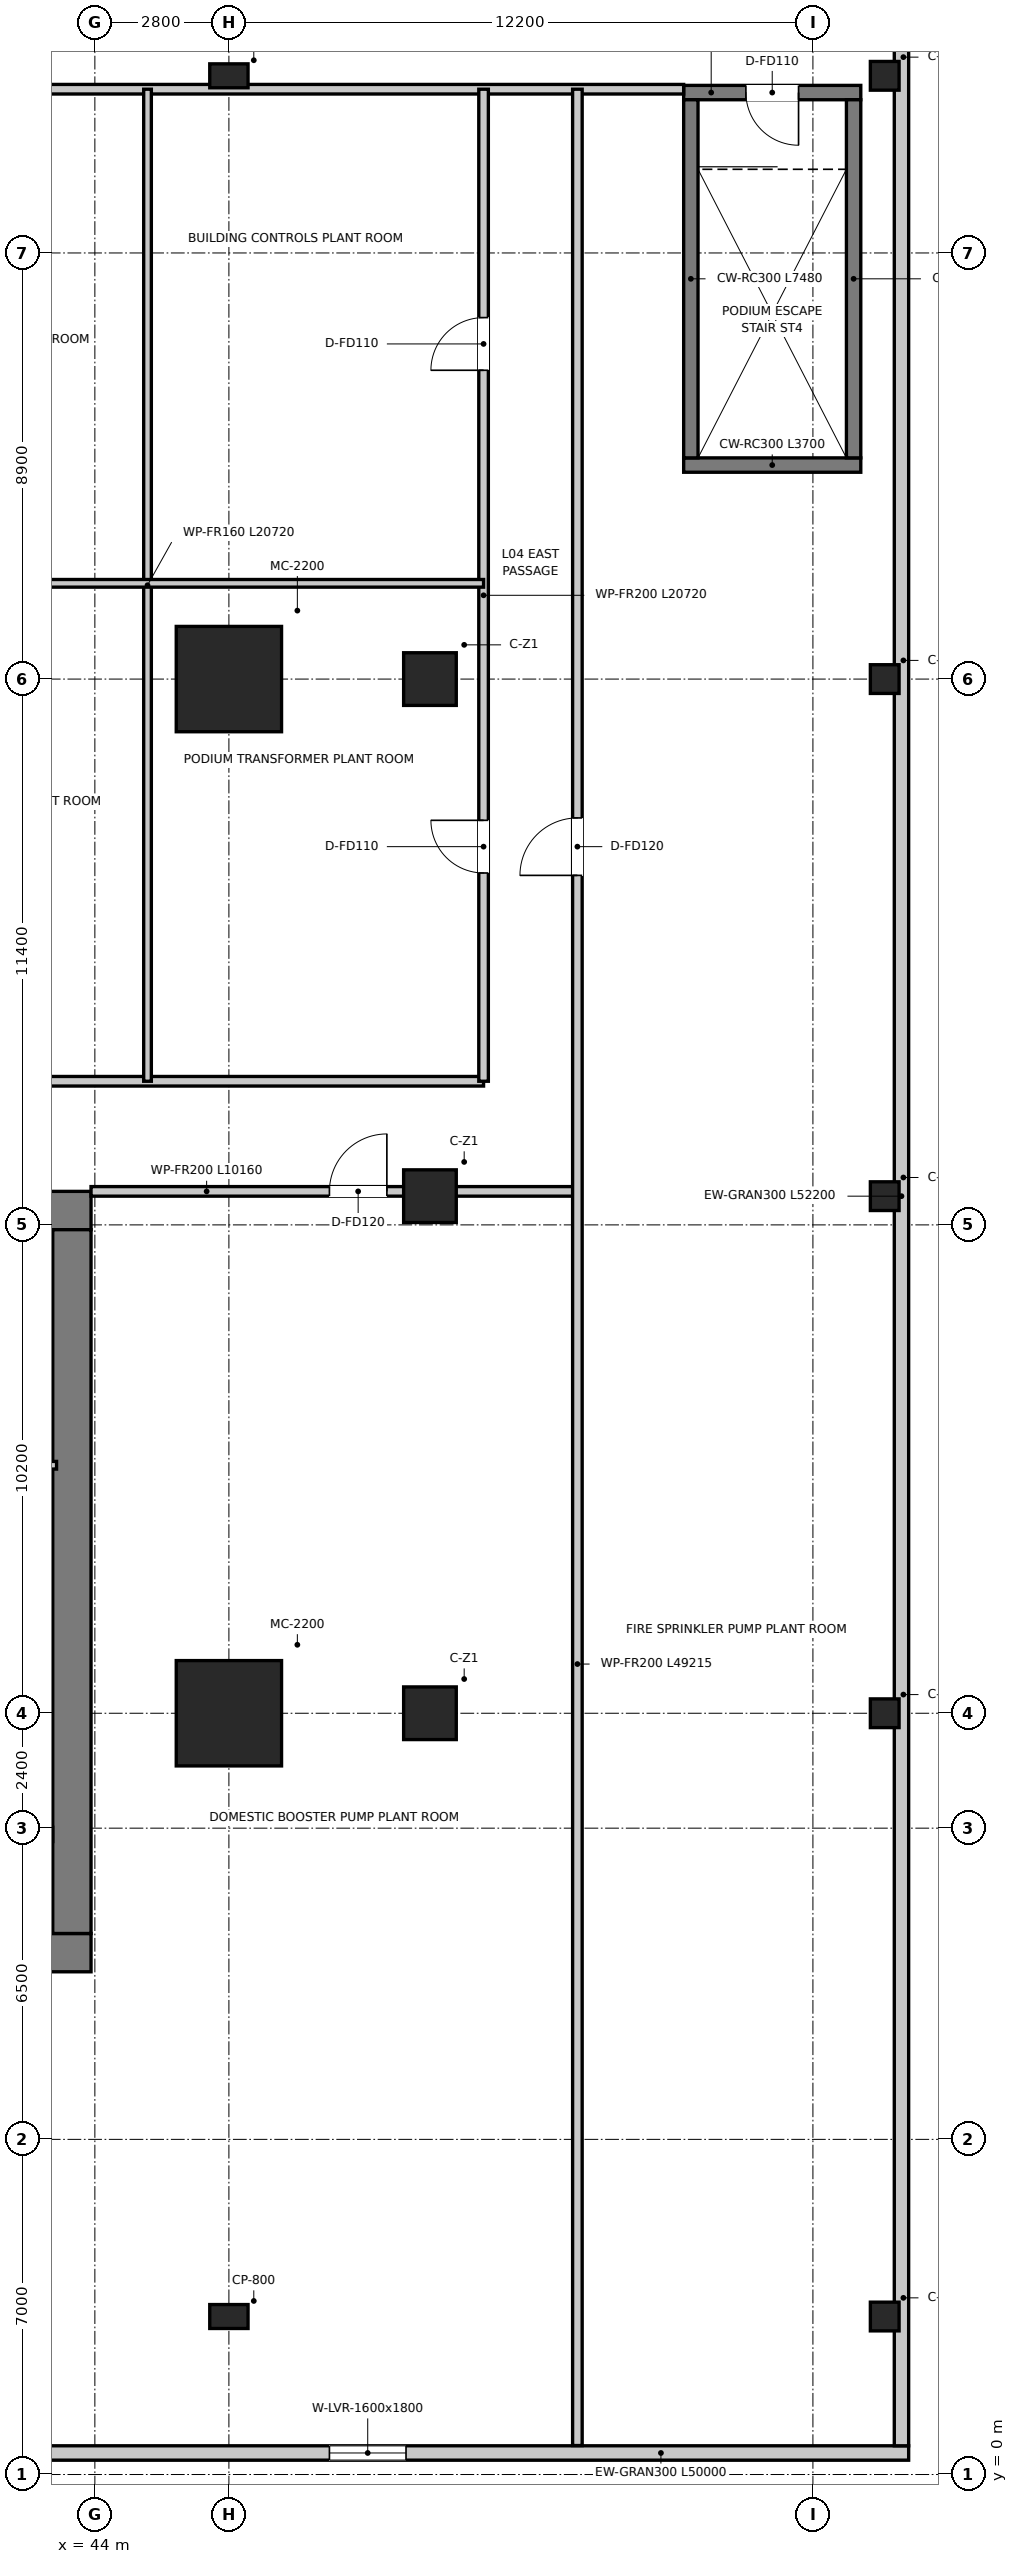
"""IFC4 building model, lengths in metres.
Left out: names, types, materials, properties, quantities, classifications, styles, units other than length and angle.
Written with IfcOpenShell. Run it as: python <this file> out.ifc"""

import sys

from ifc_helpers import new_model, si_unit, direction, frame, frame_2d, origin, origin_2d, place, context, subcontext, project, spatial, rectangle, extrude, source, transform, mapped, element, fill, save


model = new_model("IFC4")
c1 = context("Model", 3, precision=1e-05, world=origin(), true_north=direction((0.0, 1.0)))
c2 = subcontext(c1, "Body", "Model", "MODEL_VIEW")
j1 = project(units=[si_unit("LENGTHUNIT", "METRE"), si_unit("PLANEANGLEUNIT", "RADIAN")], contexts=[c1])
p1 = place(None, origin())
s1 = spatial("IfcSite", under=j1, at=p1, CompositionType="ELEMENT")
p2 = place(p1, origin())
s2 = spatial("IfcBuilding", under=s1, at=p2, CompositionType="ELEMENT")
p3 = place(p2, frame((0.0, 0.0, 20.0)))
s3 = spatial("IfcBuildingStorey", under=s2, at=p3, CompositionType="ELEMENT", Elevation=20.0)
p4 = place(p3, frame((28.08, 10.9, 0.0), z_axis=(0.0, 0.0, 1.0), x_axis=(1.0, 0.0, 0.0)))
e1 = element("IfcWall", 1, at=p4, inside=s3, PredefinedType="SHEAR", context=c2, shape_type="SweptSolid", body=[
    extrude(rectangle(XDim=15.84, YDim=0.8, at=frame_2d((7.92, 0.0))), origin(), (0.0, 0.0, 1.0), 5.0),
])
p5 = place(p3, frame((28.08, 26.4, 0.0), z_axis=(0.0, 0.0, 1.0), x_axis=(1.0, 0.0, 0.0)))
e2 = element("IfcWall", 2, at=p5, inside=s3, PredefinedType="SHEAR", context=c2, shape_type="SweptSolid", body=[
    extrude(rectangle(XDim=15.84, YDim=0.8, at=frame_2d((7.92, 0.0))), origin(), (0.0, 0.0, 1.0), 5.0),
])
p6 = place(p5, frame((7.22, 0.0, 0.0)))
e3 = element("IfcOpeningElement", 3, at=p6, cuts=e2, PredefinedType="OPENING", context=c2, shape_type="SweptSolid", body=[
    extrude(rectangle(XDim=1.4, YDim=2.2, at=frame_2d((0.7, 1.1))), frame((0.0, 0.41, 0.0), z_axis=(0.0, -1.0, 0.0), x_axis=(1.0, 0.0, 0.0)), (0.0, 0.0, 1.0), 0.82),
])
p7 = place(p5, frame((1.775, 0.0, 0.0)))
e4 = element("IfcOpeningElement", 4, at=p7, cuts=e2, PredefinedType="OPENING", context=c2, shape_type="SweptSolid", body=[
    extrude(rectangle(XDim=1.05, YDim=2.1, at=frame_2d((0.525, 1.05))), frame((0.0, 0.41, 0.0), z_axis=(0.0, -1.0, 0.0), x_axis=(1.0, 0.0, 0.0)), (0.0, 0.0, 1.0), 0.82),
])
p8 = place(p5, frame((13.015, 0.0, 0.0)))
e5 = element("IfcOpeningElement", 5, at=p8, cuts=e2, PredefinedType="OPENING", context=c2, shape_type="SweptSolid", body=[
    extrude(rectangle(XDim=1.05, YDim=2.1, at=frame_2d((0.525, 1.05))), frame((0.0, 0.41, 0.0), z_axis=(0.0, -1.0, 0.0), x_axis=(1.0, 0.0, 0.0)), (0.0, 0.0, 1.0), 0.82),
])
p9 = place(p3, frame((43.52, 11.3, 0.0), z_axis=(0.0, 0.0, 1.0), x_axis=(0.0, 1.0, 0.0)))
e6 = element("IfcWall", 6, at=p9, inside=s3, PredefinedType="SHEAR", context=c2, shape_type="SweptSolid", body=[
    extrude(rectangle(XDim=14.7, YDim=0.8, at=frame_2d((7.35, 0.0))), origin(), (0.0, 0.0, 1.0), 5.0),
])
p10 = place(p3, frame((40.02, 13.37, 0.0), z_axis=(0.0, 0.0, 1.0), x_axis=(1.0, 0.0, 0.0)))
e7 = element("IfcWall", 7, at=p10, inside=s3, PredefinedType="SHEAR", context=c2, shape_type="SweptSolid", body=[
    extrude(rectangle(XDim=3.1, YDim=0.3, at=frame_2d((1.55, 0.0))), origin(), (0.0, 0.0, 1.0), 5.0),
])
p11 = place(p3, frame((56.3, 41.97, 0.0), z_axis=(0.0, 0.0, 1.0), x_axis=(1.0, 0.0, 0.0)))
e8 = element("IfcWall", 8, at=p11, inside=s3, PredefinedType="SHEAR", context=c2, shape_type="SweptSolid", body=[
    extrude(rectangle(XDim=3.7, YDim=0.3, at=frame_2d((1.85, 0.0))), origin(), (0.0, 0.0, 1.0), 5.0),
])
p12 = place(p3, frame((60.0, 49.75, 0.0), z_axis=(0.0, 0.0, 1.0), x_axis=(-1.0, 0.0, 0.0)))
e9 = element("IfcWall", 9, at=p12, inside=s3, PredefinedType="SHEAR", context=c2, shape_type="SweptSolid", body=[
    extrude(rectangle(XDim=3.7, YDim=0.3, at=frame_2d((1.85, 0.0))), origin(), (0.0, 0.0, 1.0), 5.0),
])
p13 = place(p12, frame((1.3, 0.0, 0.0)))
e10 = element("IfcOpeningElement", 10, at=p13, cuts=e9, PredefinedType="OPENING", context=c2, shape_type="SweptSolid", body=[
    extrude(rectangle(XDim=1.1, YDim=2.15, at=frame_2d((0.55, 1.075))), frame((0.0, 0.16, 0.0), z_axis=(0.0, -1.0, 0.0), x_axis=(1.0, 0.0, 0.0)), (0.0, 0.0, 1.0), 0.32),
])
for number, where, z_axis, x_axis in (
    (11, (56.45, 42.12, 0.0), (0.0, 0.0, 1.0), (0.0, 1.0, 0.0)),
    (12, (59.85, 42.12, 0.0), (0.0, 0.0, 1.0), (0.0, 1.0, 0.0)),
):
    element("IfcWall", number, at=place(p3, frame(where, z_axis=z_axis, x_axis=x_axis)), inside=s3, PredefinedType="SHEAR", context=c2, shape_type="SweptSolid", body=[
        extrude(rectangle(XDim=7.48, YDim=0.3, at=frame_2d((3.74, 0.0))), origin(), (0.0, 0.0, 1.0), 5.0),
    ])
m1 = source(origin(), c2, "Body", "SweptSolid", [
    extrude(rectangle(XDim=2.2, YDim=2.2, at=origin_2d()), origin(), (0.0, 0.0, 1.0), 5.0),
])
for number, where, z_axis, x_axis in (
    (13, (46.8, 15.9, 0.0), (0.0, 0.0, 1.0), (1.0, 0.0, 0.0)),
    (14, (46.8, 37.5, 0.0), (0.0, 0.0, 1.0), (1.0, 0.0, 0.0)),
):
    element("IfcColumn", number, at=place(p3, frame(where, z_axis=z_axis, x_axis=x_axis)), inside=s3, PredefinedType="USERDEFINED", context=c2, shape_type="MappedRepresentation", body=[
        mapped(m1, transform((0.0, 0.0, 0.0), x_axis=(1.0, 0.0, 0.0), y_axis=(0.0, 1.0, 0.0), z_axis=(0.0, 0.0, 1.0), scale=1.0)),
    ])
m2 = source(origin(), c2, "Body", "SweptSolid", [
    extrude(rectangle(XDim=1.1, YDim=1.1, at=origin_2d()), origin(), (0.0, 0.0, 1.0), 5.0),
])
for number, where, z_axis, x_axis in (
    (15, (51.0, 37.5, 0.0), (0.0, 0.0, 1.0), (1.0, 0.0, 0.0)),
    (16, (51.0, 26.7, 0.0), (0.0, 0.0, 1.0), (1.0, 0.0, 0.0)),
    (17, (51.0, 15.9, 0.0), (0.0, 0.0, 1.0), (1.0, 0.0, 0.0)),
):
    element("IfcColumn", number, at=place(p3, frame(where, z_axis=z_axis, x_axis=x_axis)), inside=s3, PredefinedType="COLUMN", context=c2, shape_type="MappedRepresentation", body=[
        mapped(m2, transform((0.0, 0.0, 0.0), x_axis=(1.0, 0.0, 0.0), y_axis=(0.0, 1.0, 0.0), z_axis=(0.0, 0.0, 1.0), scale=1.0)),
    ])
m3 = source(origin(), c2, "Body", "SweptSolid", [
    extrude(rectangle(XDim=0.6, YDim=0.6, at=origin_2d()), origin(), (0.0, 0.0, 1.0), 5.0),
])
for number, where, z_axis, x_axis in (
    (18, (60.5, 15.9, 0.0), (0.0, 0.0, 1.0), (1.0, 0.0, 0.0)),
    (19, (60.5, 26.7, 0.0), (0.0, 0.0, 1.0), (1.0, 0.0, 0.0)),
    (20, (60.5, 37.5, 0.0), (0.0, 0.0, 1.0), (1.0, 0.0, 0.0)),
    (21, (60.5, 50.1, 0.0), (0.0, 0.0, 1.0), (1.0, 0.0, 0.0)),
    (22, (60.5, 3.3, 0.0), (0.0, 0.0, 1.0), (1.0, 0.0, 0.0)),
):
    element("IfcColumn", number, at=place(p3, frame(where, z_axis=z_axis, x_axis=x_axis)), inside=s3, PredefinedType="COLUMN", context=c2, shape_type="MappedRepresentation", body=[
        mapped(m3, transform((0.0, 0.0, 0.0), x_axis=(1.0, 0.0, 0.0), y_axis=(0.0, 1.0, 0.0), z_axis=(0.0, 0.0, 1.0), scale=1.0)),
    ])
m4 = source(origin(), c2, "Body", "SweptSolid", [
    extrude(rectangle(XDim=0.8, YDim=0.5, at=origin_2d()), origin(), (0.0, 0.0, 1.0), 5.0),
])
for number, where, z_axis, x_axis in (
    (23, (46.8, 3.3, 0.0), (0.0, 0.0, 1.0), (1.0, 0.0, 0.0)),
    (24, (46.8, 50.1, 0.0), (0.0, 0.0, 1.0), (1.0, 0.0, 0.0)),
):
    element("IfcColumn", number, at=place(p3, frame(where, z_axis=z_axis, x_axis=x_axis)), inside=s3, PredefinedType="PILASTER", context=c2, shape_type="MappedRepresentation", body=[
        mapped(m4, transform((0.0, 0.0, 0.0), x_axis=(1.0, 0.0, 0.0), y_axis=(0.0, 1.0, 0.0), z_axis=(0.0, 0.0, 1.0), scale=1.0)),
    ])
p14 = place(p3, frame((61.0, 0.45, 0.0), z_axis=(0.0, 0.0, 1.0), x_axis=(-1.0, 0.0, 0.0)))
e25 = element("IfcWall", 25, at=p14, inside=s3, PredefinedType="SOLIDWALL", context=c2, shape_type="SweptSolid", body=[
    extrude(rectangle(XDim=50.0, YDim=0.3, at=frame_2d((25.0, 0.0))), origin(), (0.0, 0.0, 1.0), 4.72),
])
p15 = place(p14, frame((43.5, 0.0, 1.2)))
e26 = element("IfcOpeningElement", 26, at=p15, cuts=e25, PredefinedType="OPENING", context=c2, shape_type="SweptSolid", body=[
    extrude(rectangle(XDim=1.6, YDim=1.8, at=frame_2d((0.8, 0.9))), frame((0.0, 0.16, 0.0), z_axis=(0.0, -1.0, 0.0), x_axis=(1.0, 0.0, 0.0)), (0.0, 0.0, 1.0), 0.32),
])
p16 = place(p14, frame((34.5, 0.0, 1.2)))
e27 = element("IfcOpeningElement", 27, at=p16, cuts=e25, PredefinedType="OPENING", context=c2, shape_type="SweptSolid", body=[
    extrude(rectangle(XDim=1.6, YDim=1.8, at=frame_2d((0.8, 0.9))), frame((0.0, 0.16, 0.0), z_axis=(0.0, -1.0, 0.0), x_axis=(1.0, 0.0, 0.0)), (0.0, 0.0, 1.0), 0.32),
])
p17 = place(p14, frame((28.0, 0.0, 1.2)))
e28 = element("IfcOpeningElement", 28, at=p17, cuts=e25, PredefinedType="OPENING", context=c2, shape_type="SweptSolid", body=[
    extrude(rectangle(XDim=1.6, YDim=1.8, at=frame_2d((0.8, 0.9))), frame((0.0, 0.16, 0.0), z_axis=(0.0, -1.0, 0.0), x_axis=(1.0, 0.0, 0.0)), (0.0, 0.0, 1.0), 0.32),
])
p18 = place(p14, frame((20.0, 0.0, 1.2)))
e29 = element("IfcOpeningElement", 29, at=p18, cuts=e25, PredefinedType="OPENING", context=c2, shape_type="SweptSolid", body=[
    extrude(rectangle(XDim=1.6, YDim=1.8, at=frame_2d((0.8, 0.9))), frame((0.0, 0.16, 0.0), z_axis=(0.0, -1.0, 0.0), x_axis=(1.0, 0.0, 0.0)), (0.0, 0.0, 1.0), 0.32),
])
p19 = place(p14, frame((10.5, 0.0, 1.2)))
e30 = element("IfcOpeningElement", 30, at=p19, cuts=e25, PredefinedType="OPENING", context=c2, shape_type="SweptSolid", body=[
    extrude(rectangle(XDim=1.6, YDim=1.8, at=frame_2d((0.8, 0.9))), frame((0.0, 0.16, 0.0), z_axis=(0.0, -1.0, 0.0), x_axis=(1.0, 0.0, 0.0)), (0.0, 0.0, 1.0), 0.32),
])
p20 = place(p3, frame((60.85, 52.8, 0.0), z_axis=(0.0, 0.0, 1.0), x_axis=(0.0, -1.0, 0.0)))
e31 = element("IfcWall", 31, at=p20, inside=s3, PredefinedType="SOLIDWALL", context=c2, shape_type="SweptSolid", body=[
    extrude(rectangle(XDim=52.2, YDim=0.3, at=frame_2d((26.1, 0.0))), origin(), (0.0, 0.0, 1.0), 4.72),
])
p21 = place(p3, frame((40.04, 21.08, 0.0), z_axis=(0.0, 0.0, 1.0), x_axis=(1.0, 0.0, 0.0)))
e32 = element("IfcWall", 32, at=p21, inside=s3, PredefinedType="PARTITIONING", context=c2, shape_type="SweptSolid", body=[
    extrude(rectangle(XDim=3.16, YDim=0.16, at=frame_2d((1.58, 0.0))), origin(), (0.0, 0.0, 1.0), 4.72),
])
p22 = place(p21, frame((1.055, 0.0, 0.0)))
e33 = element("IfcOpeningElement", 33, at=p22, cuts=e32, PredefinedType="OPENING", context=c2, shape_type="SweptSolid", body=[
    extrude(rectangle(XDim=1.05, YDim=2.1, at=frame_2d((0.525, 1.05))), frame((0.0, 0.09, 0.0), z_axis=(0.0, -1.0, 0.0), x_axis=(1.0, 0.0, 0.0)), (0.0, 0.0, 1.0), 0.18),
])
p23 = place(p3, frame((43.92, 26.8, 0.0), z_axis=(0.0, 0.0, 1.0), x_axis=(1.0, 0.0, 0.0)))
e34 = element("IfcWall", 34, at=p23, inside=s3, PredefinedType="PARTITIONING", context=c2, shape_type="SweptSolid", body=[
    extrude(rectangle(XDim=10.16, YDim=0.2, at=frame_2d((5.08, 0.0))), origin(), (0.0, 0.0, 1.0), 3.92),
])
p24 = place(p23, frame((4.98, 0.0, 0.0)))
e35 = element("IfcOpeningElement", 35, at=p24, cuts=e34, PredefinedType="OPENING", context=c2, shape_type="SweptSolid", body=[
    extrude(rectangle(XDim=1.2, YDim=2.15, at=frame_2d((0.6, 1.075))), frame((0.0, 0.11, 0.0), z_axis=(0.0, -1.0, 0.0), x_axis=(1.0, 0.0, 0.0)), (0.0, 0.0, 1.0), 0.22),
])
p25 = place(p3, frame((24.08, 29.1, 0.0), z_axis=(0.0, 0.0, 1.0), x_axis=(1.0, 0.0, 0.0)))
e36 = element("IfcWall", 36, at=p25, inside=s3, PredefinedType="PARTITIONING", context=c2, shape_type="SweptSolid", body=[
    extrude(rectangle(XDim=28.04, YDim=0.2, at=frame_2d((14.02, 0.0))), origin(), (0.0, 0.0, 1.0), 3.92),
])
p26 = place(p25, frame((9.97, 0.0, 0.0)))
e37 = element("IfcOpeningElement", 37, at=p26, cuts=e36, PredefinedType="OPENING", context=c2, shape_type="SweptSolid", body=[
    extrude(rectangle(XDim=1.1, YDim=2.15, at=frame_2d((0.55, 1.075))), frame((0.0, 0.11, 0.0), z_axis=(0.0, -1.0, 0.0), x_axis=(1.0, 0.0, 0.0)), (0.0, 0.0, 1.0), 0.22),
])
p27 = place(p25, frame((16.97, 0.0, 0.0)))
e38 = element("IfcOpeningElement", 38, at=p27, cuts=e36, PredefinedType="OPENING", context=c2, shape_type="SweptSolid", body=[
    extrude(rectangle(XDim=1.1, YDim=2.15, at=frame_2d((0.55, 1.075))), frame((0.0, 0.11, 0.0), z_axis=(0.0, -1.0, 0.0), x_axis=(1.0, 0.0, 0.0)), (0.0, 0.0, 1.0), 0.22),
])
p28 = place(p3, frame((15.6, 49.82, 0.0), z_axis=(0.0, 0.0, 1.0), x_axis=(1.0, 0.0, 0.0)))
e39 = element("IfcWall", 39, at=p28, inside=s3, PredefinedType="PARTITIONING", context=c2, shape_type="SweptSolid", body=[
    extrude(rectangle(XDim=40.7, YDim=0.2, at=frame_2d((20.35, 0.0))), origin(), (0.0, 0.0, 1.0), 4.03),
])
p29 = place(p28, frame((18.45, 0.0, 0.0)))
e40 = element("IfcOpeningElement", 40, at=p29, cuts=e39, PredefinedType="OPENING", context=c2, shape_type="SweptSolid", body=[
    extrude(rectangle(XDim=1.1, YDim=2.15, at=frame_2d((0.55, 1.075))), frame((0.0, 0.11, 0.0), z_axis=(0.0, -1.0, 0.0), x_axis=(1.0, 0.0, 0.0)), (0.0, 0.0, 1.0), 0.22),
])
p30 = place(p28, frame((25.45, 0.0, 0.0)))
e41 = element("IfcOpeningElement", 41, at=p30, cuts=e39, PredefinedType="OPENING", context=c2, shape_type="SweptSolid", body=[
    extrude(rectangle(XDim=1.1, YDim=2.15, at=frame_2d((0.55, 1.075))), frame((0.0, 0.11, 0.0), z_axis=(0.0, -1.0, 0.0), x_axis=(1.0, 0.0, 0.0)), (0.0, 0.0, 1.0), 0.22),
])
p31 = place(p3, frame((52.12, 29.1, 0.0), z_axis=(0.0, 0.0, 1.0), x_axis=(0.0, 1.0, 0.0)))
e42 = element("IfcWall", 42, at=p31, inside=s3, PredefinedType="PARTITIONING", context=c2, shape_type="SweptSolid", body=[
    extrude(rectangle(XDim=20.72, YDim=0.2, at=frame_2d((10.36, 0.0))), origin(), (0.0, 0.0, 1.0), 4.08),
])
p32 = place(p31, frame((4.35, 0.0, 0.0)))
e43 = element("IfcOpeningElement", 43, at=p32, cuts=e42, PredefinedType="OPENING", context=c2, shape_type="SweptSolid", body=[
    extrude(rectangle(XDim=1.1, YDim=2.15, at=frame_2d((0.55, 1.075))), frame((0.0, 0.11, 0.0), z_axis=(0.0, -1.0, 0.0), x_axis=(1.0, 0.0, 0.0)), (0.0, 0.0, 1.0), 0.22),
])
p33 = place(p31, frame((14.85, 0.0, 0.0)))
e44 = element("IfcOpeningElement", 44, at=p33, cuts=e42, PredefinedType="OPENING", context=c2, shape_type="SweptSolid", body=[
    extrude(rectangle(XDim=1.1, YDim=2.15, at=frame_2d((0.55, 1.075))), frame((0.0, 0.11, 0.0), z_axis=(0.0, -1.0, 0.0), x_axis=(1.0, 0.0, 0.0)), (0.0, 0.0, 1.0), 0.22),
])
p34 = place(p3, frame((54.08, 0.605, 0.0), z_axis=(0.0, 0.0, 1.0), x_axis=(0.0, 1.0, 0.0)))
e45 = element("IfcWall", 45, at=p34, inside=s3, PredefinedType="PARTITIONING", context=c2, shape_type="SweptSolid", body=[
    extrude(rectangle(XDim=49.215, YDim=0.2, at=frame_2d((24.607, 0.0))), origin(), (0.0, 0.0, 1.0), 4.08),
])
p35 = place(p34, frame((32.795, 0.0, 0.0)))
e46 = element("IfcOpeningElement", 46, at=p35, cuts=e45, PredefinedType="OPENING", context=c2, shape_type="SweptSolid", body=[
    extrude(rectangle(XDim=1.2, YDim=2.15, at=frame_2d((0.6, 1.075))), frame((0.0, 0.11, 0.0), z_axis=(0.0, -1.0, 0.0), x_axis=(1.0, 0.0, 0.0)), (0.0, 0.0, 1.0), 0.22),
])
p36 = place(p3, frame((45.1, 29.1, 0.0), z_axis=(0.0, 0.0, 1.0), x_axis=(0.0, 1.0, 0.0)))
e47 = element("IfcWall", 47, at=p36, inside=s3, PredefinedType="PARTITIONING", context=c2, shape_type="SweptSolid", body=[
    extrude(rectangle(XDim=20.72, YDim=0.16, at=frame_2d((10.36, 0.0))), origin(), (0.0, 0.0, 1.0), 3.92),
])
p37 = place(p3, frame((24.08, 39.5, 0.0), z_axis=(0.0, 0.0, 1.0), x_axis=(1.0, 0.0, 0.0)))
e48 = element("IfcWall", 48, at=p37, inside=s3, PredefinedType="PARTITIONING", context=c2, shape_type="SweptSolid", body=[
    extrude(rectangle(XDim=28.04, YDim=0.16, at=frame_2d((14.02, 0.0))), origin(), (0.0, 0.0, 1.0), 4.03),
])
p38 = place(p19, origin())
e49 = element("IfcWindow", 49, at=p38, inside=s3, PartitioningType="SINGLE_PANEL", PredefinedType="WINDOW", context=c2, shape_type="SweptSolid", body=[
    extrude(rectangle(XDim=1.6, YDim=1.8, at=frame_2d((0.8, 0.9))), frame((0.0, 0.03, 0.0), z_axis=(0.0, -1.0, 0.0), x_axis=(1.0, 0.0, 0.0)), (0.0, 0.0, 1.0), 0.06),
])
fill(e30, e49)
p39 = place(p13, origin())
e50 = element("IfcDoor", 50, at=p39, inside=s3, OperationType="SINGLE_SWING_LEFT", PredefinedType="DOOR", context=c2, shape_type="SweptSolid", body=[
    extrude(rectangle(XDim=1.1, YDim=2.15, at=frame_2d((0.55, 1.075))), frame((0.0, 0.025, 0.0), z_axis=(0.0, -1.0, 0.0), x_axis=(1.0, 0.0, 0.0)), (0.0, 0.0, 1.0), 0.05),
])
fill(e10, e50)
p40 = place(p24, origin())
e51 = element("IfcDoor", 51, at=p40, inside=s3, OperationType="SINGLE_SWING_RIGHT", PredefinedType="DOOR", context=c2, shape_type="SweptSolid", body=[
    extrude(rectangle(XDim=1.2, YDim=2.15, at=frame_2d((0.6, 1.075))), frame((0.0, 0.025, 0.0), z_axis=(0.0, -1.0, 0.0), x_axis=(1.0, 0.0, 0.0)), (0.0, 0.0, 1.0), 0.05),
])
fill(e35, e51)
p41 = place(p35, origin())
e52 = element("IfcDoor", 52, at=p41, inside=s3, OperationType="SINGLE_SWING_LEFT", PredefinedType="DOOR", context=c2, shape_type="SweptSolid", body=[
    extrude(rectangle(XDim=1.2, YDim=2.15, at=frame_2d((0.6, 1.075))), frame((0.0, 0.025, 0.0), z_axis=(0.0, -1.0, 0.0), x_axis=(1.0, 0.0, 0.0)), (0.0, 0.0, 1.0), 0.05),
])
fill(e46, e52)
p42 = place(p32, origin())
e53 = element("IfcDoor", 53, at=p42, inside=s3, OperationType="SINGLE_SWING_RIGHT", PredefinedType="DOOR", context=c2, shape_type="SweptSolid", body=[
    extrude(rectangle(XDim=1.1, YDim=2.15, at=frame_2d((0.55, 1.075))), frame((0.0, 0.025, 0.0), z_axis=(0.0, -1.0, 0.0), x_axis=(1.0, 0.0, 0.0)), (0.0, 0.0, 1.0), 0.05),
])
fill(e43, e53)
p43 = place(p33, origin())
e54 = element("IfcDoor", 54, at=p43, inside=s3, OperationType="SINGLE_SWING_LEFT", PredefinedType="DOOR", context=c2, shape_type="SweptSolid", body=[
    extrude(rectangle(XDim=1.1, YDim=2.15, at=frame_2d((0.55, 1.075))), frame((0.0, 0.025, 0.0), z_axis=(0.0, -1.0, 0.0), x_axis=(1.0, 0.0, 0.0)), (0.0, 0.0, 1.0), 0.05),
])
fill(e44, e54)
save(model, sys.argv[1])
